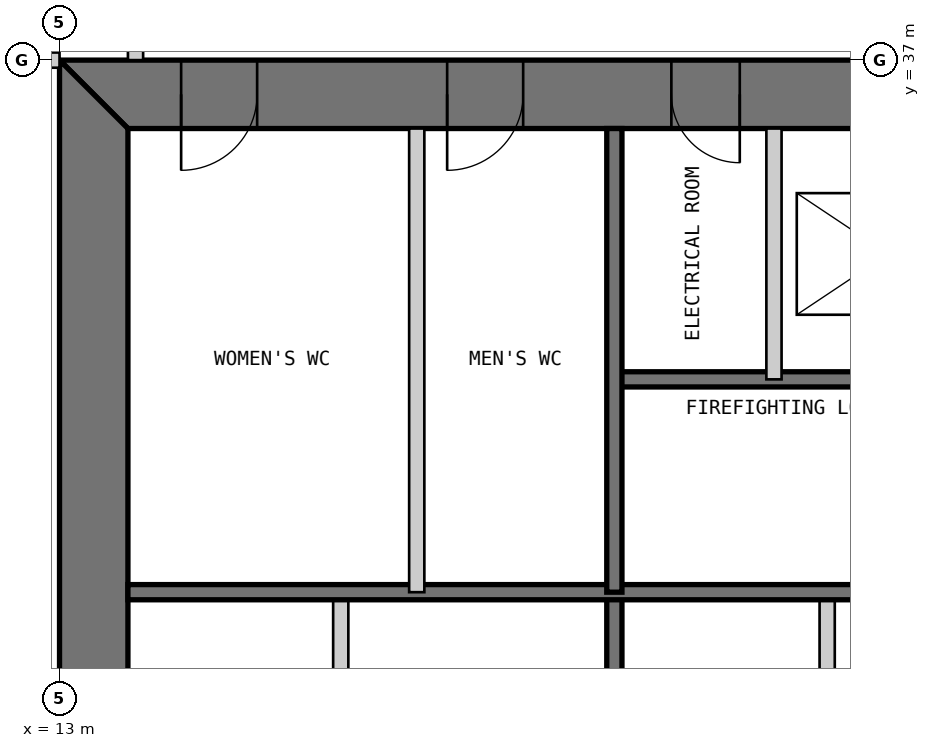
"""IFC4 building model, lengths in metres.
Left out: names, types, materials, properties, quantities, classifications, styles, units other than length and angle.
Written with IfcOpenShell. Run it as: python <this file> out.ifc"""

import sys

from ifc_helpers import new_model, si_unit, direction, frame, frame_2d, origin, place, context, subcontext, project, spatial, polyline, rectangle, outline, extrude, element, fill, save


model = new_model("IFC4")
c1 = context("Model", 3, precision=1e-05, world=origin(), true_north=direction((0.0, 1.0)))
c2 = subcontext(c1, "Body", "Model", "MODEL_VIEW")
j1 = project(units=[si_unit("LENGTHUNIT", "METRE"), si_unit("PLANEANGLEUNIT", "RADIAN")], contexts=[c1])
p1 = place(None, origin())
s1 = spatial("IfcSite", under=j1, at=p1, CompositionType="ELEMENT")
p2 = place(p1, origin())
s2 = spatial("IfcBuilding", under=s1, at=p2, CompositionType="ELEMENT")
p3 = place(p2, frame((0.0, 0.0, 26.2)))
s3 = spatial("IfcBuildingStorey", under=s2, at=p3, CompositionType="ELEMENT", Elevation=26.2)
p4 = place(p3, frame((37.0, 36.55, 0.0), z_axis=(0.0, 0.0, 1.0), x_axis=(-1.0, 0.0, 0.0)))
e1 = element("IfcWall", 1, at=p4, inside=s3, PredefinedType="SHEAR", context=c2, shape_type="SweptSolid", body=[
    extrude(outline(polyline([(0.0, -0.45), (24.0, -0.45), (23.1, 0.45), (0.9, 0.45), (0.0, -0.45)])), origin(), (0.0, 0.0, 1.0), 4.8),
])
p5 = place(p4, frame((4.9, 0.0, 0.0)))
e2 = element("IfcOpeningElement", 2, at=p5, cuts=e1, PredefinedType="OPENING", context=c2, shape_type="SweptSolid", body=[
    extrude(rectangle(XDim=1.0, YDim=2.2, at=frame_2d((0.5, 1.1))), frame((0.0, 0.46, 0.0), z_axis=(0.0, -1.0, 0.0), x_axis=(1.0, 0.0, 0.0)), (0.0, 0.0, 1.0), 0.92),
])
p6 = place(p4, frame((8.9, 0.0, 0.0)))
e3 = element("IfcOpeningElement", 3, at=p6, cuts=e1, PredefinedType="OPENING", context=c2, shape_type="SweptSolid", body=[
    extrude(rectangle(XDim=1.1, YDim=2.2, at=frame_2d((0.55, 1.1))), frame((0.0, 0.46, 0.0), z_axis=(0.0, -1.0, 0.0), x_axis=(1.0, 0.0, 0.0)), (0.0, 0.0, 1.0), 0.92),
])
p7 = place(p4, frame((15.05, 0.0, 0.0)))
e4 = element("IfcOpeningElement", 4, at=p7, cuts=e1, PredefinedType="OPENING", context=c2, shape_type="SweptSolid", body=[
    extrude(rectangle(XDim=0.9, YDim=2.2, at=frame_2d((0.45, 1.1))), frame((0.0, 0.46, 0.0), z_axis=(0.0, -1.0, 0.0), x_axis=(1.0, 0.0, 0.0)), (0.0, 0.0, 1.0), 0.92),
])
p8 = place(p4, frame((17.9, 0.0, 0.0)))
e5 = element("IfcOpeningElement", 5, at=p8, cuts=e1, PredefinedType="OPENING", context=c2, shape_type="SweptSolid", body=[
    extrude(rectangle(XDim=1.0, YDim=2.2, at=frame_2d((0.5, 1.1))), frame((0.0, 0.46, 0.0), z_axis=(0.0, -1.0, 0.0), x_axis=(1.0, 0.0, 0.0)), (0.0, 0.0, 1.0), 0.92),
])
p9 = place(p4, frame((21.4, 0.0, 0.0)))
e6 = element("IfcOpeningElement", 6, at=p9, cuts=e1, PredefinedType="OPENING", context=c2, shape_type="SweptSolid", body=[
    extrude(rectangle(XDim=1.0, YDim=2.2, at=frame_2d((0.5, 1.1))), frame((0.0, 0.46, 0.0), z_axis=(0.0, -1.0, 0.0), x_axis=(1.0, 0.0, 0.0)), (0.0, 0.0, 1.0), 0.92),
])
p10 = place(p3, frame((13.45, 36.1, 0.0), z_axis=(0.0, 0.0, 1.0), x_axis=(0.0, -1.0, 0.0)))
e7 = element("IfcWall", 7, at=p10, inside=s3, PredefinedType="SHEAR", context=c2, shape_type="SweptSolid", body=[
    extrude(outline(polyline([(-0.9, -0.45), (23.1, -0.45), (22.2, 0.45), (0.0, 0.45), (-0.9, -0.45)])), origin(), (0.0, 0.0, 1.0), 4.8),
])
p11 = place(p10, frame((20.2, 0.0, 0.0)))
e8 = element("IfcOpeningElement", 8, at=p11, cuts=e7, PredefinedType="OPENING", context=c2, shape_type="SweptSolid", body=[
    extrude(rectangle(XDim=1.0, YDim=2.2, at=frame_2d((0.5, 1.1))), frame((0.0, 0.46, 0.0), z_axis=(0.0, -1.0, 0.0), x_axis=(1.0, 0.0, 0.0)), (0.0, 0.0, 1.0), 0.92),
])
p12 = place(p10, frame((17.25, 0.0, 0.0)))
e9 = element("IfcOpeningElement", 9, at=p12, cuts=e7, PredefinedType="OPENING", context=c2, shape_type="SweptSolid", body=[
    extrude(rectangle(XDim=0.9, YDim=2.2, at=frame_2d((0.45, 1.1))), frame((0.0, 0.46, 0.0), z_axis=(0.0, -1.0, 0.0), x_axis=(1.0, 0.0, 0.0)), (0.0, 0.0, 1.0), 0.92),
])
p13 = place(p3, frame((16.7, 13.9, 0.0), z_axis=(0.0, 0.0, 1.0), x_axis=(0.0, 1.0, 0.0)))
e10 = element("IfcWall", 10, at=p13, inside=s3, PredefinedType="PARTITIONING", context=c2, shape_type="SweptSolid", body=[
    extrude(rectangle(XDim=16.1, YDim=0.2, at=frame_2d((8.05, 0.0))), origin(), (0.0, 0.0, 1.0), 4.6),
])
p14 = place(p3, frame((20.3, 13.9, 0.0), z_axis=(0.0, 0.0, 1.0), x_axis=(0.0, 1.0, 0.0)))
e11 = element("IfcWall", 11, at=p14, inside=s3, PredefinedType="SOLIDWALL", context=c2, shape_type="SweptSolid", body=[
    extrude(rectangle(XDim=16.1, YDim=0.2, at=frame_2d((8.05, 0.0))), origin(), (0.0, 0.0, 1.0), 4.6),
])
p15 = place(p3, frame((23.1, 20.0, 0.0), z_axis=(0.0, 0.0, 1.0), x_axis=(0.0, 1.0, 0.0)))
e12 = element("IfcWall", 12, at=p15, inside=s3, PredefinedType="PARTITIONING", context=c2, shape_type="SweptSolid", body=[
    extrude(rectangle(XDim=10.0, YDim=0.2, at=frame_2d((5.0, 0.0))), origin(), (0.0, 0.0, 1.0), 4.6),
])
p16 = place(p3, frame((29.7, 32.8, 0.0), z_axis=(0.0, 0.0, 1.0), x_axis=(-1.0, 0.0, 0.0)))
e13 = element("IfcWall", 13, at=p16, inside=s3, PredefinedType="SOLIDWALL", context=c2, shape_type="SweptSolid", body=[
    extrude(rectangle(XDim=9.4, YDim=0.2, at=frame_2d((4.7, 0.0))), origin(), (0.0, 0.0, 1.0), 4.6),
])
p17 = place(p16, frame((0.25, 0.0, 0.0)))
e14 = element("IfcOpeningElement", 14, at=p17, cuts=e13, PredefinedType="OPENING", context=c2, shape_type="SweptSolid", body=[
    extrude(rectangle(XDim=1.0, YDim=2.2, at=frame_2d((0.5, 1.1))), frame((0.0, 0.11, 0.0), z_axis=(0.0, -1.0, 0.0), x_axis=(1.0, 0.0, 0.0)), (0.0, 0.0, 1.0), 0.22),
])
p18 = place(p3, frame((29.7, 30.0, 0.0), z_axis=(0.0, 0.0, 1.0), x_axis=(-1.0, 0.0, 0.0)))
e15 = element("IfcWall", 15, at=p18, inside=s3, PredefinedType="SOLIDWALL", context=c2, shape_type="SweptSolid", body=[
    extrude(rectangle(XDim=15.8, YDim=0.2, at=frame_2d((7.9, 0.0))), origin(), (0.0, 0.0, 1.0), 4.6),
])
p19 = place(p3, frame((22.4, 36.1, 0.0), z_axis=(0.0, 0.0, 1.0), x_axis=(0.0, -1.0, 0.0)))
e16 = element("IfcWall", 16, at=p19, inside=s3, PredefinedType="PARTITIONING", context=c2, shape_type="SweptSolid", body=[
    extrude(rectangle(XDim=3.3, YDim=0.2, at=frame_2d((1.65, 0.0))), origin(), (0.0, 0.0, 1.0), 4.6),
])
p20 = place(p3, frame((20.3, 36.1, 0.0), z_axis=(0.0, 0.0, 1.0), x_axis=(0.0, -1.0, 0.0)))
e17 = element("IfcWall", 17, at=p20, inside=s3, PredefinedType="SOLIDWALL", context=c2, shape_type="SweptSolid", body=[
    extrude(rectangle(XDim=6.1, YDim=0.2, at=frame_2d((3.05, 0.0))), origin(), (0.0, 0.0, 1.0), 4.6),
])
p21 = place(p3, frame((17.7, 36.1, 0.0), z_axis=(0.0, 0.0, 1.0), x_axis=(0.0, -1.0, 0.0)))
e18 = element("IfcWall", 18, at=p21, inside=s3, PredefinedType="PARTITIONING", context=c2, shape_type="SweptSolid", body=[
    extrude(rectangle(XDim=6.1, YDim=0.2, at=frame_2d((3.05, 0.0))), origin(), (0.0, 0.0, 1.0), 4.6),
])
p22 = place(p3, frame((14.0, 37.0, 0.0), z_axis=(0.0, 0.0, 1.0), x_axis=(0.0, 1.0, 0.0)))
e19 = element("IfcWall", 19, at=p22, inside=s3, PredefinedType="PARTITIONING", context=c2, shape_type="SweptSolid", body=[
    extrude(rectangle(XDim=6.0, YDim=0.2, at=frame_2d((3.0, 0.0))), origin(), (0.0, 0.0, 1.0), 4.5),
])
p23 = place(p22, frame((2.55, 0.0, 0.0)))
e20 = element("IfcOpeningElement", 20, at=p23, cuts=e19, PredefinedType="OPENING", context=c2, shape_type="SweptSolid", body=[
    extrude(rectangle(XDim=0.9, YDim=2.2, at=frame_2d((0.45, 1.1))), frame((0.0, 0.11, 0.0), z_axis=(0.0, -1.0, 0.0), x_axis=(1.0, 0.0, 0.0)), (0.0, 0.0, 1.0), 0.22),
])
p24 = place(p3, frame((7.0, 37.0, 0.0), z_axis=(0.0, 0.0, 1.0), x_axis=(1.0, 0.0, 0.0)))
e21 = element("IfcWall", 21, at=p24, inside=s3, PredefinedType="PARTITIONING", context=c2, shape_type="SweptSolid", body=[
    extrude(rectangle(XDim=6.0, YDim=0.2, at=frame_2d((3.0, 0.0))), origin(), (0.0, 0.0, 1.0), 3.703),
])
p25 = place(p7, origin())
e22 = element("IfcDoor", 22, at=p25, inside=s3, OperationType="SINGLE_SWING_LEFT", PredefinedType="DOOR", context=c2, shape_type="SweptSolid", body=[
    extrude(rectangle(XDim=0.9, YDim=2.2, at=frame_2d((0.45, 1.1))), frame((0.0, 0.025, 0.0), z_axis=(0.0, -1.0, 0.0), x_axis=(1.0, 0.0, 0.0)), (0.0, 0.0, 1.0), 0.05),
    extrude(outline(polyline([(0.0, 0.0), (0.04, 0.0), (0.04, 2.16), (0.86, 2.16), (0.86, 0.0), (0.9, 0.0), (0.9, 2.2), (0.0, 2.2), (0.0, 0.0)])), frame((0.0, 0.3, 0.0), z_axis=(0.0, -1.0, 0.0), x_axis=(1.0, 0.0, 0.0)), (0.0, 0.0, 1.0), 0.6),
])
fill(e4, e22)
p26 = place(p8, origin())
e23 = element("IfcDoor", 23, at=p26, inside=s3, OperationType="SINGLE_SWING_RIGHT", PredefinedType="DOOR", context=c2, shape_type="SweptSolid", body=[
    extrude(rectangle(XDim=1.0, YDim=2.2, at=frame_2d((0.5, 1.1))), frame((0.0, 0.025, 0.0), z_axis=(0.0, -1.0, 0.0), x_axis=(1.0, 0.0, 0.0)), (0.0, 0.0, 1.0), 0.05),
    extrude(outline(polyline([(0.0, 0.0), (0.04, 0.0), (0.04, 2.16), (0.96, 2.16), (0.96, 0.0), (1.0, 0.0), (1.0, 2.2), (0.0, 2.2), (0.0, 0.0)])), frame((0.0, 0.3, 0.0), z_axis=(0.0, -1.0, 0.0), x_axis=(1.0, 0.0, 0.0)), (0.0, 0.0, 1.0), 0.6),
])
fill(e5, e23)
p27 = place(p9, origin())
e24 = element("IfcDoor", 24, at=p27, inside=s3, OperationType="SINGLE_SWING_RIGHT", PredefinedType="DOOR", context=c2, shape_type="SweptSolid", body=[
    extrude(rectangle(XDim=1.0, YDim=2.2, at=frame_2d((0.5, 1.1))), frame((0.0, 0.025, 0.0), z_axis=(0.0, -1.0, 0.0), x_axis=(1.0, 0.0, 0.0)), (0.0, 0.0, 1.0), 0.05),
    extrude(outline(polyline([(0.0, 0.0), (0.04, 0.0), (0.04, 2.16), (0.96, 2.16), (0.96, 0.0), (1.0, 0.0), (1.0, 2.2), (0.0, 2.2), (0.0, 0.0)])), frame((0.0, 0.3, 0.0), z_axis=(0.0, -1.0, 0.0), x_axis=(1.0, 0.0, 0.0)), (0.0, 0.0, 1.0), 0.6),
])
fill(e6, e24)
save(model, sys.argv[1])
